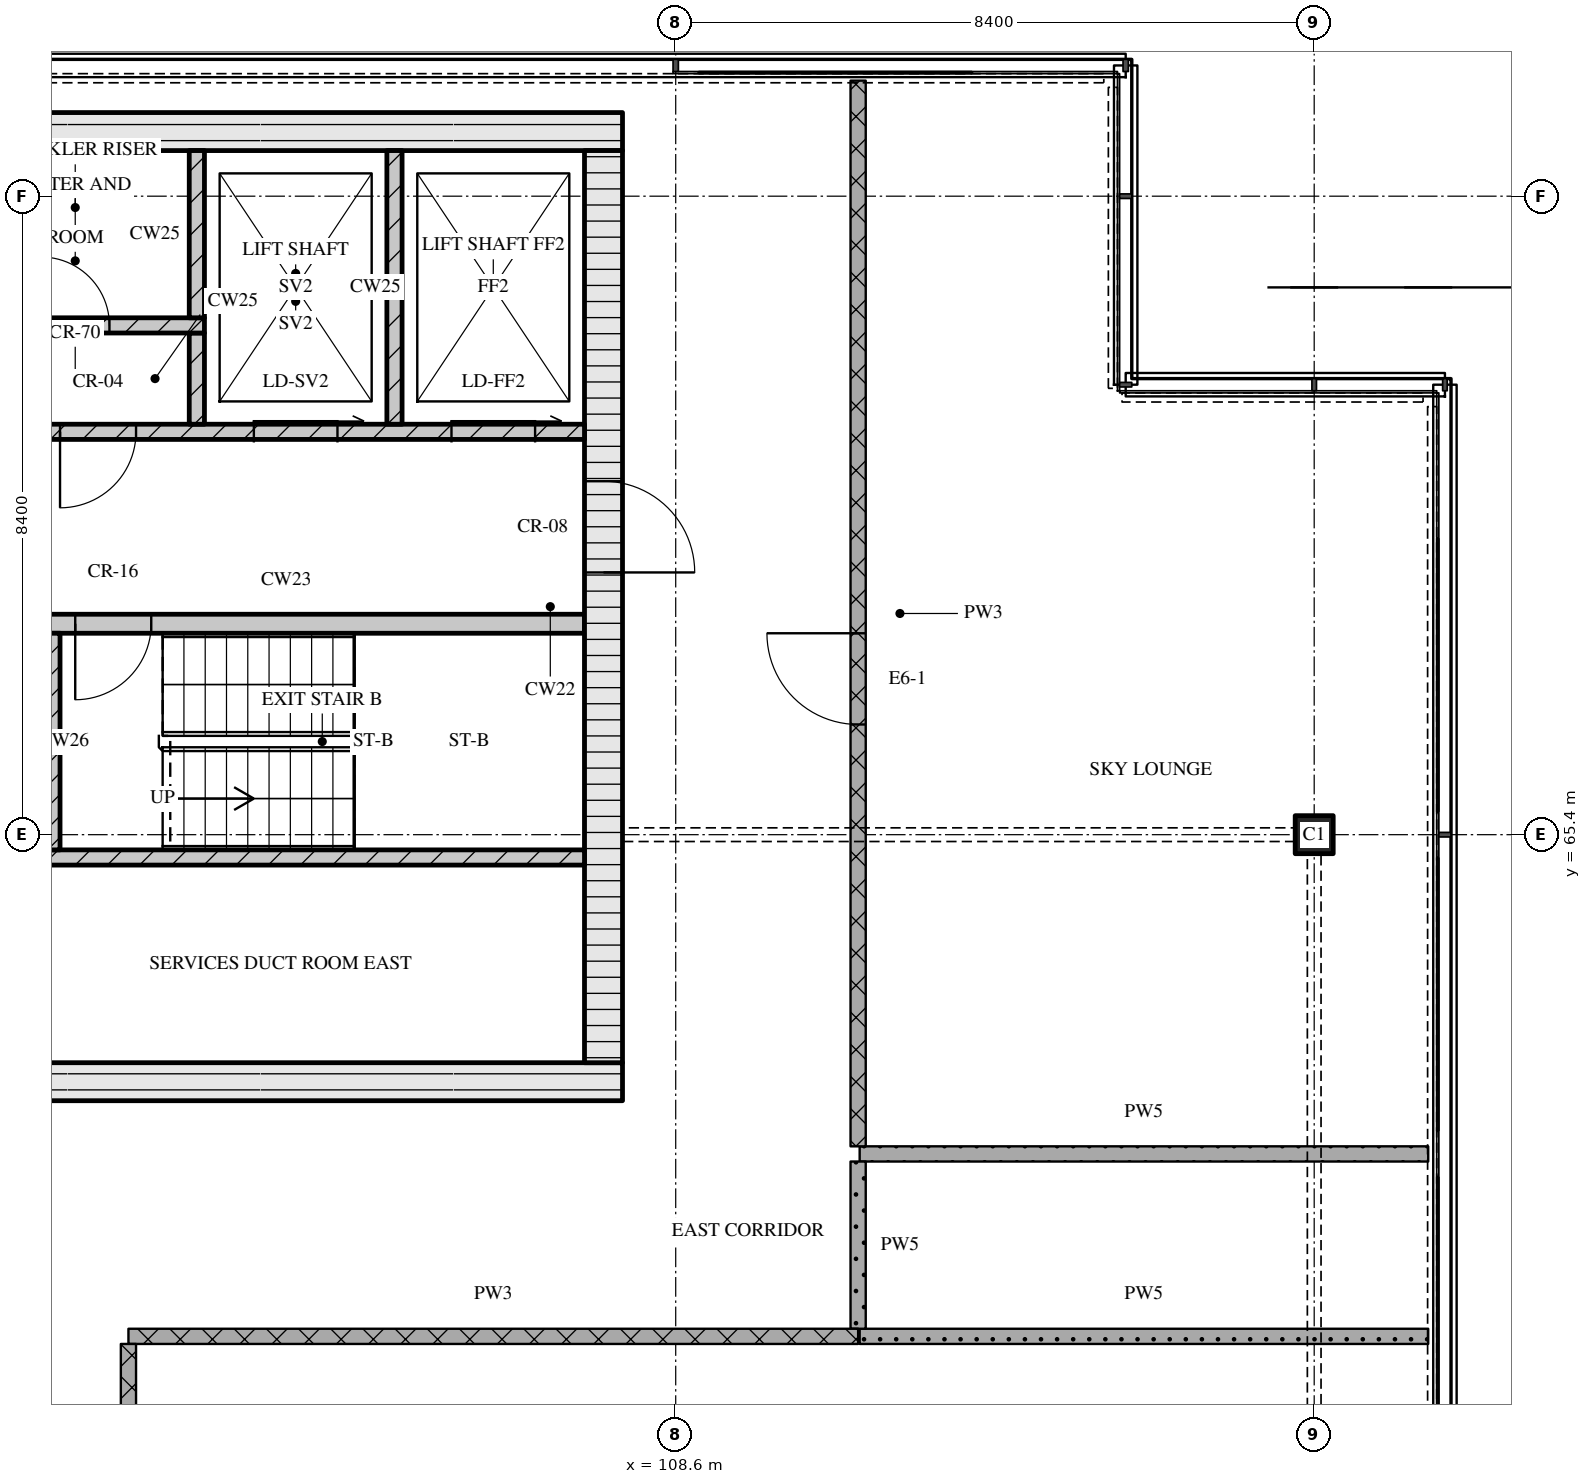
"""IFC4 building model, lengths in metres.
Left out: names, types, materials, properties, quantities, classifications, styles, units other than length and angle.
Written with IfcOpenShell. Run it as: python <this file> out.ifc"""

import sys

from ifc_helpers import new_model, si_unit, direction, frame, frame_2d, origin, origin_2d, place, context, subcontext, project, spatial, rectangle, extrude, element, fill, save


model = new_model("IFC4")
c1 = context("Model", 3, precision=1e-05, world=origin(), true_north=direction((0.0, 1.0)))
c2 = subcontext(c1, "Body", "Model", "MODEL_VIEW")
j1 = project(units=[si_unit("LENGTHUNIT", "METRE"), si_unit("PLANEANGLEUNIT", "RADIAN")], contexts=[c1])
p1 = place(None, origin())
s1 = spatial("IfcSite", under=j1, at=p1, CompositionType="ELEMENT")
p2 = place(p1, origin())
s2 = spatial("IfcBuilding", under=s1, at=p2, CompositionType="ELEMENT")
p3 = place(p2, frame((0.0, 0.0, 303.15)))
s3 = spatial("IfcBuildingStorey", under=s2, at=p3, CompositionType="ELEMENT", Elevation=303.15)
p4 = place(p3, frame((117.0, 65.4, 0.0), z_axis=(0.0, 0.0, 1.0), x_axis=(1.0, 0.0, 0.0)))
e1 = element("IfcColumn", 1, at=p4, inside=s3, PredefinedType="COLUMN", context=c2, shape_type="SweptSolid", body=[
    extrude(rectangle(XDim=0.5, YDim=0.5, at=origin_2d()), origin(), (0.0, 0.0, 1.0), 3.6),
])
p5 = place(p3, frame((67.3, 62.15, 0.0), z_axis=(0.0, 0.0, 1.0), x_axis=(1.0, 0.0, 0.0)))
e2 = element("IfcWall", 2, at=p5, inside=s3, PredefinedType="SOLIDWALL", context=c2, shape_type="SweptSolid", body=[
    extrude(rectangle(XDim=40.6, YDim=0.5, at=frame_2d((20.3, 0.0))), origin(), (0.0, 0.0, 1.0), 3.32),
])
p6 = place(p5, frame((20.65, 0.0, 0.0)))
e3 = element("IfcOpeningElement", 3, at=p6, cuts=e2, PredefinedType="OPENING", context=c2, shape_type="SweptSolid", body=[
    extrude(rectangle(XDim=1.8, YDim=2.1, at=frame_2d((0.9, 1.05))), frame((0.0, 0.26, 0.0), z_axis=(0.0, -1.0, 0.0), x_axis=(1.0, 0.0, 0.0)), (0.0, 0.0, 1.0), 0.52),
])
p7 = place(p3, frame((67.3, 74.65, 0.0), z_axis=(0.0, 0.0, 1.0), x_axis=(1.0, 0.0, 0.0)))
e4 = element("IfcWall", 4, at=p7, inside=s3, PredefinedType="SOLIDWALL", context=c2, shape_type="SweptSolid", body=[
    extrude(rectangle(XDim=40.6, YDim=0.5, at=frame_2d((20.3, 0.0))), origin(), (0.0, 0.0, 1.0), 3.32),
])
p8 = place(p3, frame((107.65, 62.4, 0.0), z_axis=(0.0, 0.0, 1.0), x_axis=(0.0, 1.0, 0.0)))
e5 = element("IfcWall", 5, at=p8, inside=s3, PredefinedType="SOLIDWALL", context=c2, shape_type="SweptSolid", body=[
    extrude(rectangle(XDim=12.0, YDim=0.5, at=frame_2d((6.0, 0.0))), origin(), (0.0, 0.0, 1.0), 3.32),
])
p9 = place(p8, frame((6.45, 0.0, 0.0)))
e6 = element("IfcOpeningElement", 6, at=p9, cuts=e5, PredefinedType="OPENING", context=c2, shape_type="SweptSolid", body=[
    extrude(rectangle(XDim=1.2, YDim=2.1, at=frame_2d((0.6, 1.05))), frame((0.0, 0.26, 0.0), z_axis=(0.0, -1.0, 0.0), x_axis=(1.0, 0.0, 0.0)), (0.0, 0.0, 1.0), 0.52),
])
p10 = place(p3, frame((91.4, 65.1, 0.0), z_axis=(0.0, 0.0, 1.0), x_axis=(1.0, 0.0, 0.0)))
e7 = element("IfcWall", 7, at=p10, inside=s3, PredefinedType="SOLIDWALL", context=c2, shape_type="SweptSolid", body=[
    extrude(rectangle(XDim=16.0, YDim=0.2, at=frame_2d((8.0, 0.0))), origin(), (0.0, 0.0, 1.0), 3.32),
])
p11 = place(p10, frame((0.85, 0.0, 0.0)))
e8 = element("IfcOpeningElement", 8, at=p11, cuts=e7, PredefinedType="OPENING", context=c2, shape_type="SweptSolid", body=[
    extrude(rectangle(XDim=1.1, YDim=2.1, at=frame_2d((0.55, 1.05))), frame((0.0, 0.11, 0.0), z_axis=(0.0, -1.0, 0.0), x_axis=(1.0, 0.0, 0.0)), (0.0, 0.0, 1.0), 0.22),
])
p12 = place(p10, frame((3.35, 0.0, 0.0)))
e9 = element("IfcOpeningElement", 9, at=p12, cuts=e7, PredefinedType="OPENING", context=c2, shape_type="SweptSolid", body=[
    extrude(rectangle(XDim=1.1, YDim=2.1, at=frame_2d((0.55, 1.05))), frame((0.0, 0.11, 0.0), z_axis=(0.0, -1.0, 0.0), x_axis=(1.0, 0.0, 0.0)), (0.0, 0.0, 1.0), 0.22),
])
p13 = place(p10, frame((5.85, 0.0, 0.0)))
e10 = element("IfcOpeningElement", 10, at=p13, cuts=e7, PredefinedType="OPENING", context=c2, shape_type="SweptSolid", body=[
    extrude(rectangle(XDim=1.1, YDim=2.1, at=frame_2d((0.55, 1.05))), frame((0.0, 0.11, 0.0), z_axis=(0.0, -1.0, 0.0), x_axis=(1.0, 0.0, 0.0)), (0.0, 0.0, 1.0), 0.22),
])
p14 = place(p10, frame((7.83, 0.0, 0.0)))
e11 = element("IfcOpeningElement", 11, at=p14, cuts=e7, PredefinedType="OPENING", context=c2, shape_type="SweptSolid", body=[
    extrude(rectangle(XDim=0.9, YDim=2.1, at=frame_2d((0.45, 1.05))), frame((0.0, 0.11, 0.0), z_axis=(0.0, -1.0, 0.0), x_axis=(1.0, 0.0, 0.0)), (0.0, 0.0, 1.0), 0.22),
])
p15 = place(p3, frame((100.35, 65.2, 0.0), z_axis=(0.0, 0.0, 1.0), x_axis=(0.0, 1.0, 0.0)))
e12 = element("IfcWall", 12, at=p15, inside=s3, PredefinedType="SOLIDWALL", context=c2, shape_type="SweptSolid", body=[
    extrude(rectangle(XDim=2.85, YDim=0.3, at=frame_2d((1.425, 0.0))), origin(), (0.0, 0.0, 1.0), 3.32),
])
p16 = place(p3, frame((98.95, 68.175, 0.0), z_axis=(0.0, 0.0, 1.0), x_axis=(1.0, 0.0, 0.0)))
e13 = element("IfcWall", 13, at=p16, inside=s3, PredefinedType="SOLIDWALL", context=c2, shape_type="SweptSolid", body=[
    extrude(rectangle(XDim=8.45, YDim=0.25, at=frame_2d((4.225, 0.0))), origin(), (0.0, 0.0, 1.0), 3.32),
])
p17 = place(p16, frame((0.45, 0.0, 0.0)))
e14 = element("IfcOpeningElement", 14, at=p17, cuts=e13, PredefinedType="OPENING", context=c2, shape_type="SweptSolid", body=[
    extrude(rectangle(XDim=0.8, YDim=2.1, at=frame_2d((0.4, 1.05))), frame((0.0, 0.135, 0.0), z_axis=(0.0, -1.0, 0.0), x_axis=(1.0, 0.0, 0.0)), (0.0, 0.0, 1.0), 0.27),
])
p18 = place(p16, frame((1.75, 0.0, 0.0)))
e15 = element("IfcOpeningElement", 15, at=p18, cuts=e13, PredefinedType="OPENING", context=c2, shape_type="SweptSolid", body=[
    extrude(rectangle(XDim=1.0, YDim=2.1, at=frame_2d((0.5, 1.05))), frame((0.0, 0.135, 0.0), z_axis=(0.0, -1.0, 0.0), x_axis=(1.0, 0.0, 0.0)), (0.0, 0.0, 1.0), 0.27),
])
p19 = place(p3, frame((67.8, 70.7, 0.0), z_axis=(0.0, 0.0, 1.0), x_axis=(1.0, 0.0, 0.0)))
e16 = element("IfcWall", 16, at=p19, inside=s3, PredefinedType="SOLIDWALL", context=c2, shape_type="SweptSolid", body=[
    extrude(rectangle(XDim=39.6, YDim=0.2, at=frame_2d((19.8, 0.0))), origin(), (0.0, 0.0, 1.0), 3.32),
])
p20 = place(p19, frame((0.65, 0.0, 0.0)))
e17 = element("IfcOpeningElement", 17, at=p20, cuts=e16, PredefinedType="OPENING", context=c2, shape_type="SweptSolid", body=[
    extrude(rectangle(XDim=1.1, YDim=2.1, at=frame_2d((0.55, 1.05))), frame((0.0, 0.11, 0.0), z_axis=(0.0, -1.0, 0.0), x_axis=(1.0, 0.0, 0.0)), (0.0, 0.0, 1.0), 0.22),
])
p21 = place(p19, frame((3.25, 0.0, 0.0)))
e18 = element("IfcOpeningElement", 18, at=p21, cuts=e16, PredefinedType="OPENING", context=c2, shape_type="SweptSolid", body=[
    extrude(rectangle(XDim=1.1, YDim=2.1, at=frame_2d((0.55, 1.05))), frame((0.0, 0.11, 0.0), z_axis=(0.0, -1.0, 0.0), x_axis=(1.0, 0.0, 0.0)), (0.0, 0.0, 1.0), 0.22),
])
p22 = place(p19, frame((5.9, 0.0, 0.0)))
e19 = element("IfcOpeningElement", 19, at=p22, cuts=e16, PredefinedType="OPENING", context=c2, shape_type="SweptSolid", body=[
    extrude(rectangle(XDim=1.0, YDim=2.1, at=frame_2d((0.5, 1.05))), frame((0.0, 0.11, 0.0), z_axis=(0.0, -1.0, 0.0), x_axis=(1.0, 0.0, 0.0)), (0.0, 0.0, 1.0), 0.22),
])
p23 = place(p19, frame((21.7, 0.0, 0.0)))
e20 = element("IfcOpeningElement", 20, at=p23, cuts=e16, PredefinedType="OPENING", context=c2, shape_type="SweptSolid", body=[
    extrude(rectangle(XDim=1.0, YDim=2.1, at=frame_2d((0.5, 1.05))), frame((0.0, 0.11, 0.0), z_axis=(0.0, -1.0, 0.0), x_axis=(1.0, 0.0, 0.0)), (0.0, 0.0, 1.0), 0.22),
])
p24 = place(p19, frame((32.7, 0.0, 0.0)))
e21 = element("IfcOpeningElement", 21, at=p24, cuts=e16, PredefinedType="OPENING", context=c2, shape_type="SweptSolid", body=[
    extrude(rectangle(XDim=1.0, YDim=2.1, at=frame_2d((0.5, 1.05))), frame((0.0, 0.11, 0.0), z_axis=(0.0, -1.0, 0.0), x_axis=(1.0, 0.0, 0.0)), (0.0, 0.0, 1.0), 0.22),
])
p25 = place(p19, frame((35.25, 0.0, 0.0)))
e22 = element("IfcOpeningElement", 22, at=p25, cuts=e16, PredefinedType="OPENING", context=c2, shape_type="SweptSolid", body=[
    extrude(rectangle(XDim=1.1, YDim=2.1, at=frame_2d((0.55, 1.05))), frame((0.0, 0.11, 0.0), z_axis=(0.0, -1.0, 0.0), x_axis=(1.0, 0.0, 0.0)), (0.0, 0.0, 1.0), 0.22),
])
p26 = place(p19, frame((37.85, 0.0, 0.0)))
e23 = element("IfcOpeningElement", 23, at=p26, cuts=e16, PredefinedType="OPENING", context=c2, shape_type="SweptSolid", body=[
    extrude(rectangle(XDim=1.1, YDim=2.1, at=frame_2d((0.55, 1.05))), frame((0.0, 0.11, 0.0), z_axis=(0.0, -1.0, 0.0), x_axis=(1.0, 0.0, 0.0)), (0.0, 0.0, 1.0), 0.22),
])
p27 = place(p3, frame((102.3, 70.8, 0.0), z_axis=(0.0, 0.0, 1.0), x_axis=(0.0, 1.0, 0.0)))
e24 = element("IfcWall", 24, at=p27, inside=s3, PredefinedType="SOLIDWALL", context=c2, shape_type="SweptSolid", body=[
    extrude(rectangle(XDim=1.2, YDim=0.2, at=frame_2d((0.6, 0.0))), origin(), (0.0, 0.0, 1.0), 3.32),
])
p28 = place(p3, frame((104.9, 70.8, 0.0), z_axis=(0.0, 0.0, 1.0), x_axis=(0.0, 1.0, 0.0)))
e25 = element("IfcWall", 25, at=p28, inside=s3, PredefinedType="SOLIDWALL", context=c2, shape_type="SweptSolid", body=[
    extrude(rectangle(XDim=3.6, YDim=0.2, at=frame_2d((1.8, 0.0))), origin(), (0.0, 0.0, 1.0), 3.32),
])
p29 = place(p3, frame((93.28, 72.1, 0.0), z_axis=(0.0, 0.0, 1.0), x_axis=(1.0, 0.0, 0.0)))
e26 = element("IfcWall", 26, at=p29, inside=s3, PredefinedType="SOLIDWALL", context=c2, shape_type="SweptSolid", body=[
    extrude(rectangle(XDim=9.12, YDim=0.2, at=frame_2d((4.56, 0.0))), origin(), (0.0, 0.0, 1.0), 3.32),
])
p30 = place(p29, frame((0.87, 0.0, 0.0)))
e27 = element("IfcOpeningElement", 27, at=p30, cuts=e26, PredefinedType="OPENING", context=c2, shape_type="SweptSolid", body=[
    extrude(rectangle(XDim=0.9, YDim=2.1, at=frame_2d((0.45, 1.05))), frame((0.0, 0.11, 0.0), z_axis=(0.0, -1.0, 0.0), x_axis=(1.0, 0.0, 0.0)), (0.0, 0.0, 1.0), 0.22),
])
p31 = place(p29, frame((3.73, 0.0, 0.0)))
e28 = element("IfcOpeningElement", 28, at=p31, cuts=e26, PredefinedType="OPENING", context=c2, shape_type="SweptSolid", body=[
    extrude(rectangle(XDim=0.9, YDim=2.1, at=frame_2d((0.45, 1.05))), frame((0.0, 0.11, 0.0), z_axis=(0.0, -1.0, 0.0), x_axis=(1.0, 0.0, 0.0)), (0.0, 0.0, 1.0), 0.22),
])
p32 = place(p29, frame((6.97, 0.0, 0.0)))
e29 = element("IfcOpeningElement", 29, at=p32, cuts=e26, PredefinedType="OPENING", context=c2, shape_type="SweptSolid", body=[
    extrude(rectangle(XDim=0.9, YDim=2.1, at=frame_2d((0.45, 1.05))), frame((0.0, 0.11, 0.0), z_axis=(0.0, -1.0, 0.0), x_axis=(1.0, 0.0, 0.0)), (0.0, 0.0, 1.0), 0.22),
])
p33 = place(p3, frame((102.3, 72.2, 0.0), z_axis=(0.0, 0.0, 1.0), x_axis=(0.0, 1.0, 0.0)))
e30 = element("IfcWall", 30, at=p33, inside=s3, PredefinedType="SOLIDWALL", context=c2, shape_type="SweptSolid", body=[
    extrude(rectangle(XDim=2.2, YDim=0.2, at=frame_2d((1.1, 0.0))), origin(), (0.0, 0.0, 1.0), 3.32),
])
p34 = place(p3, frame((101.4, 58.8, 0.0), z_axis=(0.0, 0.0, 1.0), x_axis=(1.0, 0.0, 0.0)))
e31 = element("IfcWall", 31, at=p34, inside=s3, PredefinedType="PARTITIONING", context=c2, shape_type="SweptSolid", body=[
    extrude(rectangle(XDim=9.6, YDim=0.2, at=frame_2d((4.8, 0.0))), origin(), (0.0, 0.0, 1.0), 3.32),
])
for number, where, z_axis, x_axis in (
    (32, (111.02, 58.8, 0.0), (0.0, 0.0, 1.0), (1.0, 0.0, 0.0)),
    (33, (111.02, 61.2, 0.0), (0.0, 0.0, 1.0), (1.0, 0.0, 0.0)),
):
    element("IfcWall", number, at=place(p3, frame(where, z_axis=z_axis, x_axis=x_axis)), inside=s3, PredefinedType="PARTITIONING", context=c2, shape_type="SweptSolid", body=[
        extrude(rectangle(XDim=7.48, YDim=0.2, at=frame_2d((3.74, 0.0))), origin(), (0.0, 0.0, 1.0), 3.32),
    ])
p35 = place(p3, frame((101.4, 58.7, 0.0), z_axis=(0.0, 0.0, 1.0), x_axis=(0.0, -1.0, 0.0)))
e34 = element("IfcWall", 34, at=p35, inside=s3, PredefinedType="PARTITIONING", context=c2, shape_type="SweptSolid", body=[
    extrude(rectangle(XDim=8.0, YDim=0.2, at=frame_2d((4.0, 0.0))), origin(), (0.0, 0.0, 1.0), 3.32),
])
p36 = place(p35, frame((2.45, 0.0, 0.0)))
e35 = element("IfcOpeningElement", 35, at=p36, cuts=e34, PredefinedType="OPENING", context=c2, shape_type="SweptSolid", body=[
    extrude(rectangle(XDim=1.2, YDim=2.1, at=frame_2d((0.6, 1.05))), frame((0.0, 0.11, 0.0), z_axis=(0.0, -1.0, 0.0), x_axis=(1.0, 0.0, 0.0)), (0.0, 0.0, 1.0), 0.22),
])
p37 = place(p3, frame((111.0, 75.32, 0.0), z_axis=(0.0, 0.0, 1.0), x_axis=(0.0, -1.0, 0.0)))
e36 = element("IfcWall", 36, at=p37, inside=s3, PredefinedType="PARTITIONING", context=c2, shape_type="SweptSolid", body=[
    extrude(rectangle(XDim=14.02, YDim=0.2, at=frame_2d((7.01, 0.0))), origin(), (0.0, 0.0, 1.0), 3.32),
])
p38 = place(p37, frame((7.27, 0.0, 0.0)))
e37 = element("IfcOpeningElement", 37, at=p38, cuts=e36, PredefinedType="OPENING", context=c2, shape_type="SweptSolid", body=[
    extrude(rectangle(XDim=1.2, YDim=2.1, at=frame_2d((0.6, 1.05))), frame((0.0, 0.11, 0.0), z_axis=(0.0, -1.0, 0.0), x_axis=(1.0, 0.0, 0.0)), (0.0, 0.0, 1.0), 0.22),
])
p39 = place(p3, frame((111.0, 61.1, 0.0), z_axis=(0.0, 0.0, 1.0), x_axis=(0.0, -1.0, 0.0)))
e38 = element("IfcWall", 38, at=p39, inside=s3, PredefinedType="PARTITIONING", context=c2, shape_type="SweptSolid", body=[
    extrude(rectangle(XDim=2.2, YDim=0.2, at=frame_2d((1.1, 0.0))), origin(), (0.0, 0.0, 1.0), 3.32),
])
p40 = place(p18, origin())
e39 = element("IfcDoor", 39, at=p40, inside=s3, OperationType="SINGLE_SWING_RIGHT", PredefinedType="DOOR", context=c2, shape_type="SweptSolid", body=[
    extrude(rectangle(XDim=1.0, YDim=2.1, at=frame_2d((0.5, 1.05))), frame((0.0, 0.025, 0.0), z_axis=(0.0, -1.0, 0.0), x_axis=(1.0, 0.0, 0.0)), (0.0, 0.0, 1.0), 0.05),
])
fill(e15, e39)
p41 = place(p9, origin())
e40 = element("IfcDoor", 40, at=p41, inside=s3, OperationType="SINGLE_SWING_RIGHT", PredefinedType="DOOR", context=c2, shape_type="SweptSolid", body=[
    extrude(rectangle(XDim=1.2, YDim=2.1, at=frame_2d((0.6, 1.05))), frame((0.0, 0.025, 0.0), z_axis=(0.0, -1.0, 0.0), x_axis=(1.0, 0.0, 0.0)), (0.0, 0.0, 1.0), 0.05),
])
fill(e6, e40)
p42 = place(p24, origin())
e41 = element("IfcDoor", 41, at=p42, inside=s3, OperationType="SINGLE_SWING_RIGHT", PredefinedType="DOOR", context=c2, shape_type="SweptSolid", body=[
    extrude(rectangle(XDim=1.0, YDim=2.1, at=frame_2d((0.5, 1.05))), frame((0.0, 0.025, 0.0), z_axis=(0.0, -1.0, 0.0), x_axis=(1.0, 0.0, 0.0)), (0.0, 0.0, 1.0), 0.05),
])
fill(e21, e41)
p43 = place(p25, origin())
e42 = element("IfcDoor", 42, at=p43, inside=s3, OperationType="SLIDING_TO_RIGHT", PredefinedType="DOOR", context=c2, shape_type="SweptSolid", body=[
    extrude(rectangle(XDim=1.1, YDim=2.1, at=frame_2d((0.55, 1.05))), frame((0.0, 0.025, 0.0), z_axis=(0.0, -1.0, 0.0), x_axis=(1.0, 0.0, 0.0)), (0.0, 0.0, 1.0), 0.05),
])
fill(e22, e42)
p44 = place(p26, origin())
e43 = element("IfcDoor", 43, at=p44, inside=s3, OperationType="SLIDING_TO_RIGHT", PredefinedType="DOOR", context=c2, shape_type="SweptSolid", body=[
    extrude(rectangle(XDim=1.1, YDim=2.1, at=frame_2d((0.55, 1.05))), frame((0.0, 0.025, 0.0), z_axis=(0.0, -1.0, 0.0), x_axis=(1.0, 0.0, 0.0)), (0.0, 0.0, 1.0), 0.05),
])
fill(e23, e43)
p45 = place(p32, origin())
e44 = element("IfcDoor", 44, at=p45, inside=s3, OperationType="SINGLE_SWING_LEFT", PredefinedType="DOOR", context=c2, shape_type="SweptSolid", body=[
    extrude(rectangle(XDim=0.9, YDim=2.1, at=frame_2d((0.45, 1.05))), frame((0.0, 0.025, 0.0), z_axis=(0.0, -1.0, 0.0), x_axis=(1.0, 0.0, 0.0)), (0.0, 0.0, 1.0), 0.05),
])
fill(e29, e44)
p46 = place(p38, origin())
e45 = element("IfcDoor", 45, at=p46, inside=s3, OperationType="SINGLE_SWING_RIGHT", PredefinedType="DOOR", context=c2, shape_type="SweptSolid", body=[
    extrude(rectangle(XDim=1.2, YDim=2.1, at=frame_2d((0.6, 1.05))), frame((0.0, 0.025, 0.0), z_axis=(0.0, -1.0, 0.0), x_axis=(1.0, 0.0, 0.0)), (0.0, 0.0, 1.0), 0.05),
])
fill(e37, e45)
save(model, sys.argv[1])
